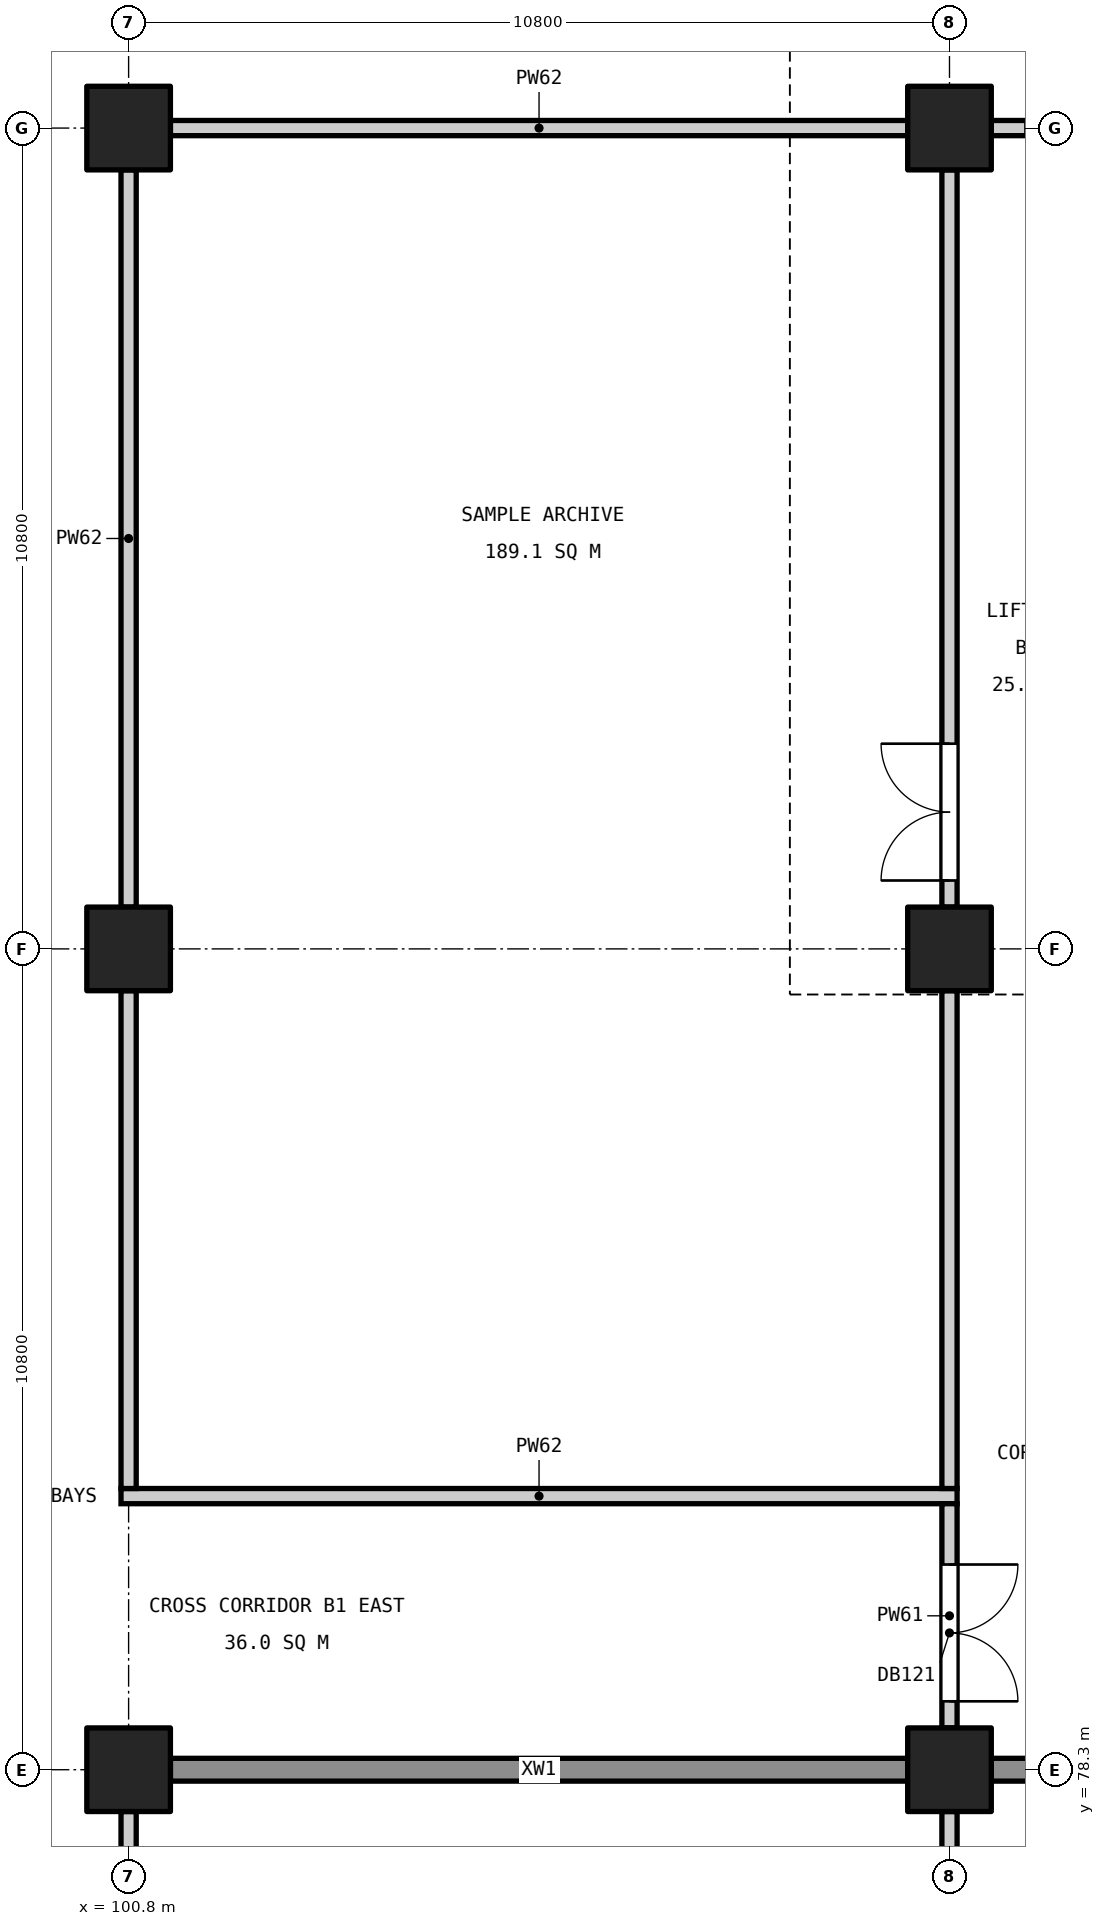
"""IFC4 building model, lengths in metres.
Left out: names, types, materials, properties, quantities, classifications, styles, units other than length and angle.
Written with IfcOpenShell. Run it as: python <this file> out.ifc"""

import sys

from ifc_helpers import new_model, si_unit, direction, frame, frame_2d, origin, origin_2d, place, context, subcontext, project, spatial, rectangle, extrude, element, fill, save


model = new_model("IFC4")
c1 = context("Model", 3, precision=1e-05, world=origin(), true_north=direction((0.0, 1.0)))
c2 = subcontext(c1, "Body", "Model", "MODEL_VIEW")
j1 = project(units=[si_unit("LENGTHUNIT", "METRE"), si_unit("PLANEANGLEUNIT", "RADIAN")], contexts=[c1])
p1 = place(None, origin())
s1 = spatial("IfcSite", under=j1, at=p1, CompositionType="ELEMENT")
p2 = place(p1, origin())
s2 = spatial("IfcBuilding", under=s1, at=p2, CompositionType="ELEMENT")
p3 = place(p2, frame((0.0, 0.0, -4.8)))
s3 = spatial("IfcBuildingStorey", under=s2, at=p3, CompositionType="ELEMENT", Elevation=-4.8)
for number, where, z_axis, x_axis in (
    (1, (111.6, 78.3, 0.0), (0.0, 0.0, 1.0), (1.0, 0.0, 0.0)),
    (2, (111.6, 89.1, 0.0), (0.0, 0.0, 1.0), (1.0, 0.0, 0.0)),
    (3, (111.6, 99.9, 0.0), (0.0, 0.0, 1.0), (1.0, 0.0, 0.0)),
    (4, (100.8, 78.3, 0.0), (0.0, 0.0, 1.0), (1.0, 0.0, 0.0)),
    (5, (100.8, 89.1, 0.0), (0.0, 0.0, 1.0), (1.0, 0.0, 0.0)),
    (6, (100.8, 99.9, 0.0), (0.0, 0.0, 1.0), (1.0, 0.0, 0.0)),
):
    element("IfcColumn", number, at=place(p3, frame(where, z_axis=z_axis, x_axis=x_axis)), inside=s3, PredefinedType="COLUMN", context=c2, shape_type="SweptSolid", body=[
        extrude(rectangle(XDim=1.1, YDim=1.1, at=origin_2d()), origin(), (0.0, 0.0, 1.0), 4.5),
    ])
p4 = place(p3, frame((118.25, 78.3, 0.0), z_axis=(0.0, 0.0, 1.0), x_axis=(-1.0, 0.0, 0.0)))
e7 = element("IfcWall", 7, at=p4, inside=s3, PredefinedType="SHEAR", context=c2, shape_type="SweptSolid", body=[
    extrude(rectangle(XDim=6.1, YDim=0.3, at=frame_2d((3.05, 0.0))), origin(), (0.0, 0.0, 1.0), 4.5),
])
p5 = place(p4, frame((2.15, 0.0, 0.0)))
e8 = element("IfcOpeningElement", 8, at=p5, cuts=e7, PredefinedType="OPENING", context=c2, shape_type="SweptSolid", body=[
    extrude(rectangle(XDim=1.8, YDim=2.1, at=frame_2d((0.9, 1.05))), frame((0.0, 0.16, 0.0), z_axis=(0.0, -1.0, 0.0), x_axis=(1.0, 0.0, 0.0)), (0.0, 0.0, 1.0), 0.32),
])
p6 = place(p3, frame((111.05, 78.3, 0.0), z_axis=(0.0, 0.0, 1.0), x_axis=(-1.0, 0.0, 0.0)))
e9 = element("IfcWall", 9, at=p6, inside=s3, PredefinedType="SHEAR", context=c2, shape_type="SweptSolid", body=[
    extrude(rectangle(XDim=9.7, YDim=0.3, at=frame_2d((4.85, 0.0))), origin(), (0.0, 0.0, 1.0), 4.5),
])
p7 = place(p3, frame((100.7, 81.9, 0.0), z_axis=(0.0, 0.0, 1.0), x_axis=(1.0, 0.0, 0.0)))
e10 = element("IfcWall", 10, at=p7, inside=s3, PredefinedType="PARTITIONING", context=c2, shape_type="SweptSolid", body=[
    extrude(rectangle(XDim=11.0, YDim=0.2, at=frame_2d((5.5, 0.0))), origin(), (0.0, 0.0, 1.0), 3.7),
])
p8 = place(p3, frame((101.35, 99.9, 0.0), z_axis=(0.0, 0.0, 1.0), x_axis=(1.0, 0.0, 0.0)))
e11 = element("IfcWall", 11, at=p8, inside=s3, PredefinedType="PARTITIONING", context=c2, shape_type="SweptSolid", body=[
    extrude(rectangle(XDim=9.7, YDim=0.2, at=frame_2d((4.85, 0.0))), origin(), (0.0, 0.0, 1.0), 3.7),
])
p9 = place(p3, frame((112.15, 99.9, 0.0), z_axis=(0.0, 0.0, 1.0), x_axis=(1.0, 0.0, 0.0)))
e12 = element("IfcWall", 12, at=p9, inside=s3, PredefinedType="PARTITIONING", context=c2, shape_type="SweptSolid", body=[
    extrude(rectangle(XDim=1.9, YDim=0.2, at=frame_2d((0.95, 0.0))), origin(), (0.0, 0.0, 1.0), 3.7),
])
p10 = place(p9, frame((0.45, 0.0, 0.0)))
e13 = element("IfcOpeningElement", 13, at=p10, cuts=e12, PredefinedType="OPENING", context=c2, shape_type="SweptSolid", body=[
    extrude(rectangle(XDim=1.0, YDim=2.1, at=frame_2d((0.5, 1.05))), frame((0.0, 0.11, 0.0), z_axis=(0.0, -1.0, 0.0), x_axis=(1.0, 0.0, 0.0)), (0.0, 0.0, 1.0), 0.22),
])
p11 = place(p3, frame((100.8, 68.05, 0.0), z_axis=(0.0, 0.0, 1.0), x_axis=(0.0, 1.0, 0.0)))
e14 = element("IfcWall", 14, at=p11, inside=s3, PredefinedType="PARTITIONING", context=c2, shape_type="SweptSolid", body=[
    extrude(rectangle(XDim=9.7, YDim=0.2, at=frame_2d((4.85, 0.0))), origin(), (0.0, 0.0, 1.0), 3.4),
])
p12 = place(p3, frame((100.8, 82.0, 0.0), z_axis=(0.0, 0.0, 1.0), x_axis=(0.0, 1.0, 0.0)))
e15 = element("IfcWall", 15, at=p12, inside=s3, PredefinedType="PARTITIONING", context=c2, shape_type="SweptSolid", body=[
    extrude(rectangle(XDim=6.55, YDim=0.2, at=frame_2d((3.275, 0.0))), origin(), (0.0, 0.0, 1.0), 3.4),
])
p13 = place(p3, frame((100.8, 89.65, 0.0), z_axis=(0.0, 0.0, 1.0), x_axis=(0.0, 1.0, 0.0)))
e16 = element("IfcWall", 16, at=p13, inside=s3, PredefinedType="PARTITIONING", context=c2, shape_type="SweptSolid", body=[
    extrude(rectangle(XDim=9.7, YDim=0.2, at=frame_2d((4.85, 0.0))), origin(), (0.0, 0.0, 1.0), 3.4),
])
p14 = place(p3, frame((111.6, 71.2, 0.0), z_axis=(0.0, 0.0, 1.0), x_axis=(0.0, 1.0, 0.0)))
e17 = element("IfcWall", 17, at=p14, inside=s3, PredefinedType="PARTITIONING", context=c2, shape_type="SweptSolid", body=[
    extrude(rectangle(XDim=6.55, YDim=0.2, at=frame_2d((3.275, 0.0))), origin(), (0.0, 0.0, 1.0), 3.4),
])
p15 = place(p14, frame((0.3, 0.0, 0.0)))
e18 = element("IfcOpeningElement", 18, at=p15, cuts=e17, PredefinedType="OPENING", context=c2, shape_type="SweptSolid", body=[
    extrude(rectangle(XDim=1.8, YDim=2.1, at=frame_2d((0.9, 1.05))), frame((0.0, 0.11, 0.0), z_axis=(0.0, -1.0, 0.0), x_axis=(1.0, 0.0, 0.0)), (0.0, 0.0, 1.0), 0.22),
])
p16 = place(p3, frame((111.6, 78.85, 0.0), z_axis=(0.0, 0.0, 1.0), x_axis=(0.0, 1.0, 0.0)))
e19 = element("IfcWall", 19, at=p16, inside=s3, PredefinedType="PARTITIONING", context=c2, shape_type="SweptSolid", body=[
    extrude(rectangle(XDim=2.95, YDim=0.2, at=frame_2d((1.475, 0.0))), origin(), (0.0, 0.0, 1.0), 3.4),
])
p17 = place(p16, frame((0.35, 0.0, 0.0)))
e20 = element("IfcOpeningElement", 20, at=p17, cuts=e19, PredefinedType="OPENING", context=c2, shape_type="SweptSolid", body=[
    extrude(rectangle(XDim=1.8, YDim=2.1, at=frame_2d((0.9, 1.05))), frame((0.0, 0.11, 0.0), z_axis=(0.0, -1.0, 0.0), x_axis=(1.0, 0.0, 0.0)), (0.0, 0.0, 1.0), 0.22),
])
p18 = place(p3, frame((111.6, 82.0, 0.0), z_axis=(0.0, 0.0, 1.0), x_axis=(0.0, 1.0, 0.0)))
e21 = element("IfcWall", 21, at=p18, inside=s3, PredefinedType="PARTITIONING", context=c2, shape_type="SweptSolid", body=[
    extrude(rectangle(XDim=6.55, YDim=0.2, at=frame_2d((3.275, 0.0))), origin(), (0.0, 0.0, 1.0), 3.4),
])
p19 = place(p3, frame((111.6, 89.65, 0.0), z_axis=(0.0, 0.0, 1.0), x_axis=(0.0, 1.0, 0.0)))
e22 = element("IfcWall", 22, at=p19, inside=s3, PredefinedType="PARTITIONING", context=c2, shape_type="SweptSolid", body=[
    extrude(rectangle(XDim=9.7, YDim=0.2, at=frame_2d((4.85, 0.0))), origin(), (0.0, 0.0, 1.0), 3.4),
])
p20 = place(p19, frame((0.35, 0.0, 0.0)))
e23 = element("IfcOpeningElement", 23, at=p20, cuts=e22, PredefinedType="OPENING", context=c2, shape_type="SweptSolid", body=[
    extrude(rectangle(XDim=1.8, YDim=2.1, at=frame_2d((0.9, 1.05))), frame((0.0, 0.11, 0.0), z_axis=(0.0, -1.0, 0.0), x_axis=(1.0, 0.0, 0.0)), (0.0, 0.0, 1.0), 0.22),
])
p21 = place(p20, origin())
e24 = element("IfcDoor", 24, at=p21, inside=s3, OperationType="DOUBLE_DOOR_SINGLE_SWING", PredefinedType="DOOR", context=c2, shape_type="SweptSolid", body=[
    extrude(rectangle(XDim=1.8, YDim=2.1, at=frame_2d((0.9, 1.05))), frame((0.0, 0.025, 0.0), z_axis=(0.0, -1.0, 0.0), x_axis=(1.0, 0.0, 0.0)), (0.0, 0.0, 1.0), 0.05),
])
fill(e23, e24)
p22 = place(p10, origin())
e25 = element("IfcDoor", 25, at=p22, inside=s3, OperationType="SINGLE_SWING_RIGHT", PredefinedType="DOOR", context=c2, shape_type="SweptSolid", body=[
    extrude(rectangle(XDim=1.0, YDim=2.1, at=frame_2d((0.5, 1.05))), frame((0.0, 0.025, 0.0), z_axis=(0.0, -1.0, 0.0), x_axis=(1.0, 0.0, 0.0)), (0.0, 0.0, 1.0), 0.05),
])
fill(e13, e25)
p23 = place(p17, frame((1.8, 0.0, 0.0), z_axis=(0.0, 0.0, 1.0), x_axis=(-1.0, 0.0, 0.0)))
e26 = element("IfcDoor", 26, at=p23, inside=s3, OperationType="DOUBLE_DOOR_SINGLE_SWING", PredefinedType="DOOR", context=c2, shape_type="SweptSolid", body=[
    extrude(rectangle(XDim=1.8, YDim=2.1, at=frame_2d((0.9, 1.05))), frame((0.0, 0.025, 0.0), z_axis=(0.0, -1.0, 0.0), x_axis=(1.0, 0.0, 0.0)), (0.0, 0.0, 1.0), 0.05),
])
fill(e20, e26)
save(model, sys.argv[1])
